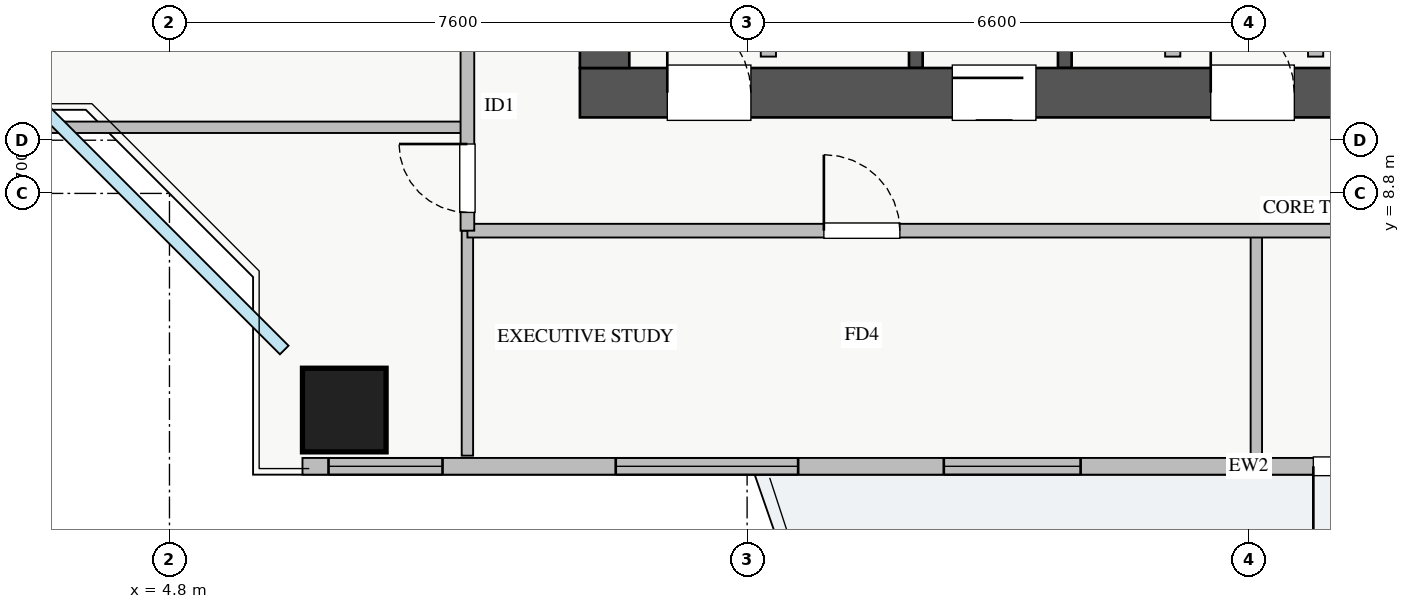
"""IFC4 building model, lengths in metres.
Left out: names, types, materials, properties, quantities, classifications, styles, units other than length and angle.
Written with IfcOpenShell. Run it as: python <this file> out.ifc"""

import sys

from ifc_helpers import new_model, si_unit, direction, frame, frame_2d, origin, origin_2d, place, context, subcontext, project, spatial, rectangle, extrude, source, transform, mapped, element, fill, save


model = new_model("IFC4")
c1 = context("Model", 3, precision=1e-05, world=origin(), true_north=direction((0.0, 1.0)))
c2 = subcontext(c1, "Body", "Model", "MODEL_VIEW")
j1 = project(units=[si_unit("LENGTHUNIT", "METRE"), si_unit("PLANEANGLEUNIT", "RADIAN")], contexts=[c1])
p1 = place(None, origin())
s1 = spatial("IfcSite", under=j1, at=p1, CompositionType="ELEMENT")
p2 = place(p1, origin())
s2 = spatial("IfcBuilding", under=s1, at=p2, CompositionType="ELEMENT")
p3 = place(p2, frame((0.0, 0.0, 129.5)))
s3 = spatial("IfcBuildingStorey", under=s2, at=p3, CompositionType="ELEMENT", Elevation=129.5)
for number, where, z_axis, x_axis in (
    (1, (14.62, 10.45, 0.0), (0.0, 0.0, 1.0), (0.0, 1.0, 0.0)),
    (2, (16.58, 10.45, 0.0), (0.0, 0.0, 1.0), (0.0, 1.0, 0.0)),
):
    element("IfcWall", number, at=place(p3, frame(where, z_axis=z_axis, x_axis=x_axis)), inside=s3, PredefinedType="SHEAR", context=c2, shape_type="SweptSolid", body=[
        extrude(rectangle(XDim=2.35, YDim=0.18, at=frame_2d((1.175, 0.0))), origin(), (0.0, 0.0, 1.0), 3.07),
    ])
p4 = place(p3, frame((10.2, 10.125, 0.0), z_axis=(0.0, 0.0, 1.0), x_axis=(1.0, 0.0, 0.0)))
e3 = element("IfcWall", 3, at=p4, inside=s3, PredefinedType="SHEAR", context=c2, shape_type="SweptSolid", body=[
    extrude(rectangle(XDim=17.6, YDim=0.65, at=frame_2d((8.8, 0.0))), origin(), (0.0, 0.0, 1.0), 3.25),
])
p5 = place(p4, frame((1.15, 0.0, 0.0)))
e4 = element("IfcOpeningElement", 4, at=p5, cuts=e3, PredefinedType="OPENING", context=c2, shape_type="SweptSolid", body=[
    extrude(rectangle(XDim=1.1, YDim=2.05, at=frame_2d((0.55, 1.025))), frame((0.0, 0.335, 0.0), z_axis=(0.0, -1.0, 0.0), x_axis=(1.0, 0.0, 0.0)), (0.0, 0.0, 1.0), 0.67),
])
p6 = place(p4, frame((8.3, 0.0, 0.0)))
e5 = element("IfcOpeningElement", 5, at=p6, cuts=e3, PredefinedType="OPENING", context=c2, shape_type="SweptSolid", body=[
    extrude(rectangle(XDim=1.1, YDim=2.05, at=frame_2d((0.55, 1.025))), frame((0.0, 0.335, 0.0), z_axis=(0.0, -1.0, 0.0), x_axis=(1.0, 0.0, 0.0)), (0.0, 0.0, 1.0), 0.67),
])
p7 = place(p4, frame((4.9, 0.0, 0.0)))
e6 = element("IfcOpeningElement", 6, at=p7, cuts=e3, PredefinedType="OPENING", context=c2, shape_type="SweptSolid", body=[
    extrude(rectangle(XDim=1.1, YDim=2.05, at=frame_2d((0.55, 1.025))), frame((0.0, 0.335, 0.0), z_axis=(0.0, -1.0, 0.0), x_axis=(1.0, 0.0, 0.0)), (0.0, 0.0, 1.0), 0.67),
])
p8 = place(p4, frame((14.74, 0.0, 0.0)))
e7 = element("IfcOpeningElement", 7, at=p8, cuts=e3, PredefinedType="OPENING", context=c2, shape_type="SweptSolid", body=[
    extrude(rectangle(XDim=1.0, YDim=2.05, at=frame_2d((0.5, 1.025))), frame((0.0, 0.335, 0.0), z_axis=(0.0, -1.0, 0.0), x_axis=(1.0, 0.0, 0.0)), (0.0, 0.0, 1.0), 0.67),
])
p9 = place(p4, frame((10.64, 0.0, 0.0)))
e8 = element("IfcOpeningElement", 8, at=p9, cuts=e3, PredefinedType="OPENING", context=c2, shape_type="SweptSolid", body=[
    extrude(rectangle(XDim=1.0, YDim=2.05, at=frame_2d((0.5, 1.025))), frame((0.0, 0.335, 0.0), z_axis=(0.0, -1.0, 0.0), x_axis=(1.0, 0.0, 0.0)), (0.0, 0.0, 1.0), 0.67),
])
p10 = place(p4, frame((13.09, 0.0, 0.0)))
e9 = element("IfcOpeningElement", 9, at=p10, cuts=e3, PredefinedType="OPENING", context=c2, shape_type="SweptSolid", body=[
    extrude(rectangle(XDim=1.0, YDim=2.05, at=frame_2d((0.5, 1.025))), frame((0.0, 0.335, 0.0), z_axis=(0.0, -1.0, 0.0), x_axis=(1.0, 0.0, 0.0)), (0.0, 0.0, 1.0), 0.67),
])
p11 = place(p3, frame((10.525, 10.45, 0.0), z_axis=(0.0, 0.0, 1.0), x_axis=(0.0, 1.0, 0.0)))
e10 = element("IfcWall", 10, at=p11, inside=s3, PredefinedType="SHEAR", context=c2, shape_type="SweptSolid", body=[
    extrude(rectangle(XDim=5.9, YDim=0.65, at=frame_2d((2.95, 0.0))), origin(), (0.0, 0.0, 1.0), 3.25),
])
m1 = source(origin(), c2, "Body", "SweptSolid", [
    extrude(rectangle(XDim=1.1, YDim=1.1, at=origin_2d()), origin(), (0.0, 0.0, 1.0), 3.25),
])
p12 = place(p3, frame((7.1, 5.95, 0.0), z_axis=(0.0, 0.0, 1.0), x_axis=(1.0, 0.0, 0.0)))
e11 = element("IfcColumn", 11, at=p12, inside=s3, PredefinedType="COLUMN", context=c2, shape_type="MappedRepresentation", body=[
    mapped(m1, transform((0.0, 0.0, 0.0), x_axis=(1.0, 0.0, 0.0), y_axis=(0.0, 1.0, 0.0), z_axis=(0.0, 0.0, 1.0), scale=1.0)),
])
p13 = place(p3, frame((6.55, 5.21, 0.0), z_axis=(0.0, 0.0, 1.0), x_axis=(1.0, 0.0, 0.0)))
e12 = element("IfcWall", 12, at=p13, inside=s3, PredefinedType="STANDARD", context=c2, shape_type="SweptSolid", body=[
    extrude(rectangle(XDim=24.9, YDim=0.22, at=frame_2d((12.45, 0.0))), origin(), (0.0, 0.0, 1.0), 2.61),
])
p14 = place(p13, frame((13.3, 0.0, 0.0)))
e13 = element("IfcOpeningElement", 13, at=p14, cuts=e12, PredefinedType="OPENING", context=c2, shape_type="SweptSolid", body=[
    extrude(rectangle(XDim=1.2, YDim=2.1, at=frame_2d((0.6, 1.05))), frame((0.0, 0.12, 0.0), z_axis=(0.0, -1.0, 0.0), x_axis=(1.0, 0.0, 0.0)), (0.0, 0.0, 1.0), 0.24),
])
p15 = place(p13, frame((0.343, 0.0, 0.9)))
e14 = element("IfcOpeningElement", 14, at=p15, cuts=e12, PredefinedType="OPENING", context=c2, shape_type="SweptSolid", body=[
    extrude(rectangle(XDim=1.5, YDim=1.5, at=frame_2d((0.75, 0.75))), frame((0.0, 0.12, 0.0), z_axis=(0.0, -1.0, 0.0), x_axis=(1.0, 0.0, 0.0)), (0.0, 0.0, 1.0), 0.24),
])
p16 = place(p13, frame((8.438, 0.0, 0.9)))
e15 = element("IfcOpeningElement", 15, at=p16, cuts=e12, PredefinedType="OPENING", context=c2, shape_type="SweptSolid", body=[
    extrude(rectangle(XDim=1.8, YDim=1.45, at=frame_2d((0.9, 0.725))), frame((0.0, 0.12, 0.0), z_axis=(0.0, -1.0, 0.0), x_axis=(1.0, 0.0, 0.0)), (0.0, 0.0, 1.0), 0.24),
])
p17 = place(p13, frame((14.813, 0.0, 0.9)))
e16 = element("IfcOpeningElement", 16, at=p17, cuts=e12, PredefinedType="OPENING", context=c2, shape_type="SweptSolid", body=[
    extrude(rectangle(XDim=1.5, YDim=1.45, at=frame_2d((0.75, 0.725))), frame((0.0, 0.12, 0.0), z_axis=(0.0, -1.0, 0.0), x_axis=(1.0, 0.0, 0.0)), (0.0, 0.0, 1.0), 0.24),
])
p18 = place(p13, frame((20.738, 0.0, 0.9)))
e17 = element("IfcOpeningElement", 17, at=p18, cuts=e12, PredefinedType="OPENING", context=c2, shape_type="SweptSolid", body=[
    extrude(rectangle(XDim=2.1, YDim=1.48, at=frame_2d((1.05, 0.74))), frame((0.0, 0.12, 0.0), z_axis=(0.0, -1.0, 0.0), x_axis=(1.0, 0.0, 0.0)), (0.0, 0.0, 1.0), 0.24),
])
p19 = place(p13, frame((4.122, 0.0, 0.9)))
e18 = element("IfcOpeningElement", 18, at=p19, cuts=e12, PredefinedType="OPENING", context=c2, shape_type="SweptSolid", body=[
    extrude(rectangle(XDim=2.4, YDim=1.5, at=frame_2d((1.2, 0.75))), frame((0.0, 0.12, 0.0), z_axis=(0.0, -1.0, 0.0), x_axis=(1.0, 0.0, 0.0)), (0.0, 0.0, 1.0), 0.24),
])
for number, where, z_axis, x_axis in (
    (19, (12.68, 10.6, 0.0), (0.0, 0.0, 1.0), (0.0, 1.0, 0.0)),
    (20, (18.0, 10.6, 0.0), (0.0, 0.0, 1.0), (0.0, 1.0, 0.0)),
    (21, (19.88, 10.6, 0.0), (0.0, 0.0, 1.0), (0.0, 1.0, 0.0)),
):
    element("IfcWall", number, at=place(p3, frame(where, z_axis=z_axis, x_axis=x_axis)), inside=s3, PredefinedType="PARTITIONING", context=c2, shape_type="SweptSolid", body=[
        extrude(rectangle(XDim=2.21, YDim=0.2, at=frame_2d((1.105, 0.0))), origin(), (0.0, 0.0, 1.0), 3.07),
    ])
p20 = place(p3, frame((19.1, 5.35, 0.0), z_axis=(0.0, 0.0, 1.0), x_axis=(0.0, 1.0, 0.0)))
e22 = element("IfcWall", 22, at=p20, inside=s3, PredefinedType="PARTITIONING", context=c2, shape_type="SweptSolid", body=[
    extrude(rectangle(XDim=2.96, YDim=0.15, at=frame_2d((1.48, 0.0))), origin(), (0.0, 0.0, 1.0), 2.765),
])
p21 = place(p3, frame((8.72, 5.35, 0.0), z_axis=(0.0, 0.0, 1.0), x_axis=(0.0, 1.0, 0.0)))
e23 = element("IfcWall", 23, at=p21, inside=s3, PredefinedType="PARTITIONING", context=c2, shape_type="SweptSolid", body=[
    extrude(rectangle(XDim=2.96, YDim=0.15, at=frame_2d((1.48, 0.0))), origin(), (0.0, 0.0, 1.0), 3.07),
])
p22 = place(p3, frame((8.72, 8.31, 0.0), z_axis=(0.0, 0.0, 1.0), x_axis=(1.0, 0.0, 0.0)))
e24 = element("IfcWall", 24, at=p22, inside=s3, PredefinedType="PARTITIONING", context=c2, shape_type="SweptSolid", body=[
    extrude(rectangle(XDim=23.63, YDim=0.18, at=frame_2d((11.815, 0.0))), origin(), (0.0, 0.0, 1.0), 3.07),
])
p23 = place(p22, frame((4.69, 0.0, 0.0)))
e25 = element("IfcOpeningElement", 25, at=p23, cuts=e24, PredefinedType="OPENING", context=c2, shape_type="SweptSolid", body=[
    extrude(rectangle(XDim=1.0, YDim=2.05, at=frame_2d((0.5, 1.025))), frame((0.0, 0.1, 0.0), z_axis=(0.0, -1.0, 0.0), x_axis=(1.0, 0.0, 0.0)), (0.0, 0.0, 1.0), 0.2),
])
p24 = place(p22, frame((16.32, 0.0, 0.0)))
e26 = element("IfcOpeningElement", 26, at=p24, cuts=e24, PredefinedType="OPENING", context=c2, shape_type="SweptSolid", body=[
    extrude(rectangle(XDim=1.0, YDim=2.05, at=frame_2d((0.5, 1.025))), frame((0.0, 0.1, 0.0), z_axis=(0.0, -1.0, 0.0), x_axis=(1.0, 0.0, 0.0)), (0.0, 0.0, 1.0), 0.2),
])
p25 = place(p3, frame((1.35, 9.67, 0.0), z_axis=(0.0, 0.0, 1.0), x_axis=(1.0, 0.0, 0.0)))
e27 = element("IfcWall", 27, at=p25, inside=s3, PredefinedType="PARTITIONING", context=c2, shape_type="SweptSolid", body=[
    extrude(rectangle(XDim=7.37, YDim=0.15, at=frame_2d((3.685, 0.0))), origin(), (0.0, 0.0, 1.0), 3.07),
])
p26 = place(p3, frame((8.72, 8.31, 0.0), z_axis=(0.0, 0.0, 1.0), x_axis=(0.0, 1.0, 0.0)))
e28 = element("IfcWall", 28, at=p26, inside=s3, PredefinedType="PARTITIONING", context=c2, shape_type="SweptSolid", body=[
    extrude(rectangle(XDim=29.37, YDim=0.18, at=frame_2d((14.685, 0.0))), origin(), (0.0, 0.0, 1.0), 3.07),
])
p27 = place(p26, frame((28.06, 0.0, 0.0)))
e29 = element("IfcOpeningElement", 29, at=p27, cuts=e28, PredefinedType="OPENING", context=c2, shape_type="SweptSolid", body=[
    extrude(rectangle(XDim=0.9, YDim=2.05, at=frame_2d((0.45, 1.025))), frame((0.0, 0.1, 0.0), z_axis=(0.0, -1.0, 0.0), x_axis=(1.0, 0.0, 0.0)), (0.0, 0.0, 1.0), 0.2),
])
p28 = place(p26, frame((0.24, 0.0, 0.0)))
e30 = element("IfcOpeningElement", 30, at=p28, cuts=e28, PredefinedType="OPENING", context=c2, shape_type="SweptSolid", body=[
    extrude(rectangle(XDim=0.9, YDim=2.05, at=frame_2d((0.45, 1.025))), frame((0.0, 0.1, 0.0), z_axis=(0.0, -1.0, 0.0), x_axis=(1.0, 0.0, 0.0)), (0.0, 0.0, 1.0), 0.2),
])
p29 = place(p26, frame((2.92, 0.0, 0.0)))
e31 = element("IfcOpeningElement", 31, at=p29, cuts=e28, PredefinedType="OPENING", context=c2, shape_type="SweptSolid", body=[
    extrude(rectangle(XDim=1.0, YDim=2.05, at=frame_2d((0.5, 1.025))), frame((0.0, 0.1, 0.0), z_axis=(0.0, -1.0, 0.0), x_axis=(1.0, 0.0, 0.0)), (0.0, 0.0, 1.0), 0.2),
])
p30 = place(p26, frame((14.315, 0.0, 0.0)))
e32 = element("IfcOpeningElement", 32, at=p30, cuts=e28, PredefinedType="OPENING", context=c2, shape_type="SweptSolid", body=[
    extrude(rectangle(XDim=1.0, YDim=2.05, at=frame_2d((0.5, 1.025))), frame((0.0, 0.1, 0.0), z_axis=(0.0, -1.0, 0.0), x_axis=(1.0, 0.0, 0.0)), (0.0, 0.0, 1.0), 0.2),
])
p31 = place(p26, frame((20.315, 0.0, 0.0)))
e33 = element("IfcOpeningElement", 33, at=p31, cuts=e28, PredefinedType="OPENING", context=c2, shape_type="SweptSolid", body=[
    extrude(rectangle(XDim=1.0, YDim=2.05, at=frame_2d((0.5, 1.025))), frame((0.0, 0.1, 0.0), z_axis=(0.0, -1.0, 0.0), x_axis=(1.0, 0.0, 0.0)), (0.0, 0.0, 1.0), 0.2),
])
m2 = source(origin(), c2, "Body", "SweptSolid", [
    extrude(rectangle(XDim=1.2, YDim=2.1, at=frame_2d((0.6, 1.05))), frame((0.0, 0.025, 0.0), z_axis=(0.0, -1.0, 0.0), x_axis=(1.0, 0.0, 0.0)), (0.0, 0.0, 1.0), 0.05),
])
p32 = place(p14, frame((1.2, 0.0, 0.0), z_axis=(0.0, 0.0, 1.0), x_axis=(-1.0, 0.0, 0.0)))
e34 = element("IfcDoor", 34, at=p32, inside=s3, OperationType="SINGLE_SWING_LEFT", PredefinedType="DOOR", context=c2, shape_type="MappedRepresentation", body=[
    mapped(m2, transform((0.0, 0.0, 0.0), x_axis=(1.0, 0.0, 0.0), y_axis=(0.0, 1.0, 0.0), z_axis=(0.0, 0.0, 1.0), scale=1.0)),
])
fill(e13, e34)
m3 = source(origin(), c2, "Body", "SweptSolid", [
    extrude(rectangle(XDim=1.5, YDim=1.5, at=frame_2d((0.75, 0.75))), frame((0.0, 0.03, 0.0), z_axis=(0.0, -1.0, 0.0), x_axis=(1.0, 0.0, 0.0)), (0.0, 0.0, 1.0), 0.06),
])
p33 = place(p15, origin())
e35 = element("IfcWindow", 35, at=p33, inside=s3, PartitioningType="TRIPLE_PANEL_VERTICAL", PredefinedType="WINDOW", context=c2, shape_type="MappedRepresentation", body=[
    mapped(m3, transform((0.0, 0.0, 0.0), x_axis=(1.0, 0.0, 0.0), y_axis=(0.0, 1.0, 0.0), z_axis=(0.0, 0.0, 1.0), scale=1.0)),
])
fill(e14, e35)
m4 = source(origin(), c2, "Body", "SweptSolid", [
    extrude(rectangle(XDim=1.8, YDim=1.45, at=frame_2d((0.9, 0.725))), frame((0.0, 0.03, 0.0), z_axis=(0.0, -1.0, 0.0), x_axis=(1.0, 0.0, 0.0)), (0.0, 0.0, 1.0), 0.06),
])
p34 = place(p16, origin())
e36 = element("IfcWindow", 36, at=p34, inside=s3, PartitioningType="DOUBLE_PANEL_VERTICAL", PredefinedType="WINDOW", context=c2, shape_type="MappedRepresentation", body=[
    mapped(m4, transform((0.0, 0.0, 0.0), x_axis=(1.0, 0.0, 0.0), y_axis=(0.0, 1.0, 0.0), z_axis=(0.0, 0.0, 1.0), scale=1.0)),
])
fill(e15, e36)
m5 = source(origin(), c2, "Body", "SweptSolid", [
    extrude(rectangle(XDim=1.1, YDim=2.05, at=frame_2d((0.55, 1.025))), frame((0.0, 0.025, 0.0), z_axis=(0.0, -1.0, 0.0), x_axis=(1.0, 0.0, 0.0)), (0.0, 0.0, 1.0), 0.05),
])
p35 = place(p5, origin())
e37 = element("IfcDoor", 37, at=p35, inside=s3, OperationType="SINGLE_SWING_LEFT", PredefinedType="DOOR", context=c2, shape_type="MappedRepresentation", body=[
    mapped(m5, transform((0.0, 0.0, 0.0), x_axis=(1.0, 0.0, 0.0), y_axis=(0.0, 1.0, 0.0), z_axis=(0.0, 0.0, 1.0), scale=1.0)),
])
fill(e4, e37)
p36 = place(p6, origin())
e38 = element("IfcDoor", 38, at=p36, inside=s3, OperationType="SINGLE_SWING_LEFT", PredefinedType="DOOR", context=c2, shape_type="MappedRepresentation", body=[
    mapped(m5, transform((0.0, 0.0, 0.0), x_axis=(1.0, 0.0, 0.0), y_axis=(0.0, 1.0, 0.0), z_axis=(0.0, 0.0, 1.0), scale=1.0)),
])
fill(e5, e38)
p37 = place(p7, origin())
e39 = element("IfcDoor", 39, at=p37, inside=s3, OperationType="SLIDING_TO_RIGHT", PredefinedType="DOOR", context=c2, shape_type="MappedRepresentation", body=[
    mapped(m5, transform((0.0, 0.0, 0.0), x_axis=(1.0, 0.0, 0.0), y_axis=(0.0, 1.0, 0.0), z_axis=(0.0, 0.0, 1.0), scale=1.0)),
])
fill(e6, e39)
m6 = source(origin(), c2, "Body", "SweptSolid", [
    extrude(rectangle(XDim=1.0, YDim=2.05, at=frame_2d((0.5, 1.025))), frame((0.0, 0.025, 0.0), z_axis=(0.0, -1.0, 0.0), x_axis=(1.0, 0.0, 0.0)), (0.0, 0.0, 1.0), 0.05),
])
p38 = place(p23, origin())
e40 = element("IfcDoor", 40, at=p38, inside=s3, OperationType="SINGLE_SWING_LEFT", PredefinedType="DOOR", context=c2, shape_type="MappedRepresentation", body=[
    mapped(m6, transform((0.0, 0.0, 0.0), x_axis=(1.0, 0.0, 0.0), y_axis=(0.0, 1.0, 0.0), z_axis=(0.0, 0.0, 1.0), scale=1.0)),
])
fill(e25, e40)
m7 = source(origin(), c2, "Body", "SweptSolid", [
    extrude(rectangle(XDim=0.9, YDim=2.05, at=frame_2d((0.45, 1.025))), frame((0.0, 0.025, 0.0), z_axis=(0.0, -1.0, 0.0), x_axis=(1.0, 0.0, 0.0)), (0.0, 0.0, 1.0), 0.05),
])
p39 = place(p28, origin())
e41 = element("IfcDoor", 41, at=p39, inside=s3, OperationType="SINGLE_SWING_RIGHT", PredefinedType="DOOR", context=c2, shape_type="MappedRepresentation", body=[
    mapped(m7, transform((0.0, 0.0, 0.0), x_axis=(1.0, 0.0, 0.0), y_axis=(0.0, 1.0, 0.0), z_axis=(0.0, 0.0, 1.0), scale=1.0)),
])
fill(e30, e41)
m8 = source(origin(), c2, "Body", "SweptSolid", [
    extrude(rectangle(XDim=2.4, YDim=1.5, at=frame_2d((1.2, 0.75))), frame((0.0, 0.03, 0.0), z_axis=(0.0, -1.0, 0.0), x_axis=(1.0, 0.0, 0.0)), (0.0, 0.0, 1.0), 0.06),
])
p40 = place(p19, origin())
e42 = element("IfcWindow", 42, at=p40, inside=s3, PartitioningType="TRIPLE_PANEL_VERTICAL", PredefinedType="WINDOW", context=c2, shape_type="MappedRepresentation", body=[
    mapped(m8, transform((0.0, 0.0, 0.0), x_axis=(1.0, 0.0, 0.0), y_axis=(0.0, 1.0, 0.0), z_axis=(0.0, 0.0, 1.0), scale=1.0)),
])
fill(e18, e42)
save(model, sys.argv[1])
